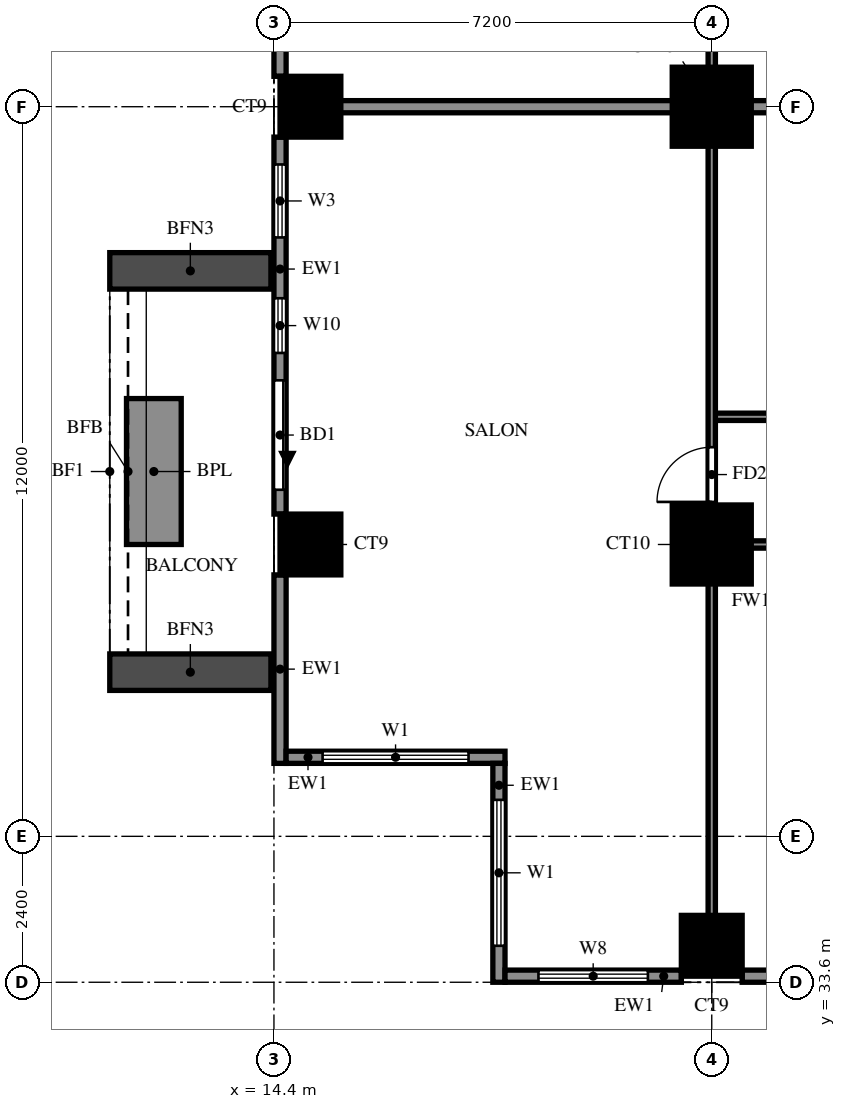
"""IFC4 building model, lengths in metres.
Left out: names, types, materials, properties, quantities, classifications, styles, units other than length and angle.
Written with IfcOpenShell. Run it as: python <this file> out.ifc"""

import sys

from ifc_helpers import new_model, si_unit, direction, frame, frame_2d, origin, origin_2d, place, context, subcontext, project, spatial, rectangle, extrude, source, transform, mapped, element, fill, save


model = new_model("IFC4")
c1 = context("Model", 3, precision=1e-05, world=origin(), true_north=direction((0.0, 1.0)))
c2 = subcontext(c1, "Body", "Model", "MODEL_VIEW")
j1 = project(units=[si_unit("LENGTHUNIT", "METRE"), si_unit("PLANEANGLEUNIT", "RADIAN")], contexts=[c1])
p1 = place(None, origin())
s1 = spatial("IfcSite", under=j1, at=p1, CompositionType="ELEMENT")
p2 = place(p1, origin())
s2 = spatial("IfcBuilding", under=s1, at=p2, CompositionType="ELEMENT")
p3 = place(p2, frame((0.0, 0.0, 86.5)))
s3 = spatial("IfcBuildingStorey", under=s2, at=p3, CompositionType="ELEMENT", Elevation=86.5)
m1 = source(origin(), c2, "Body", "SweptSolid", [
    extrude(rectangle(XDim=1.0, YDim=1.0, at=origin_2d()), origin(), (0.0, 0.0, 1.0), 3.18),
])
for number, where, z_axis, x_axis in (
    (1, (21.6, 34.2, 0.0), (0.0, 0.0, 1.0), (1.0, 0.0, 0.0)),
    (2, (15.0, 40.8, 0.0), (0.0, 0.0, 1.0), (1.0, 0.0, 0.0)),
):
    element("IfcColumn", number, at=place(p3, frame(where, z_axis=z_axis, x_axis=x_axis)), inside=s3, PredefinedType="COLUMN", context=c2, shape_type="MappedRepresentation", body=[
        mapped(m1, transform((0.0, 0.0, 0.0))),
    ])
m2 = source(origin(), c2, "Body", "SweptSolid", [
    extrude(rectangle(XDim=1.3, YDim=1.3, at=origin_2d()), origin(), (0.0, 0.0, 1.0), 3.18),
])
p4 = place(p3, frame((21.6, 40.8, 0.0), z_axis=(0.0, 0.0, 1.0), x_axis=(1.0, 0.0, 0.0)))
e3 = element("IfcColumn", 3, at=p4, inside=s3, PredefinedType="COLUMN", context=c2, shape_type="MappedRepresentation", body=[
    mapped(m2, transform((0.0, 0.0, 0.0))),
])
p5 = place(p3, frame((15.0, 48.0, 0.0), z_axis=(0.0, 0.0, 1.0), x_axis=(1.0, 0.0, 0.0)))
e4 = element("IfcColumn", 4, at=p5, inside=s3, PredefinedType="COLUMN", context=c2, shape_type="MappedRepresentation", body=[
    mapped(m1, transform((0.0, 0.0, 0.0))),
])
p6 = place(p3, frame((21.6, 48.0, 0.0), z_axis=(0.0, 0.0, 1.0), x_axis=(1.0, 0.0, 0.0)))
e5 = element("IfcColumn", 5, at=p6, inside=s3, PredefinedType="COLUMN", context=c2, shape_type="MappedRepresentation", body=[
    mapped(m2, transform((0.0, 0.0, 0.0))),
])
p7 = place(p3, frame((14.5, 54.7, 0.0), z_axis=(0.0, 0.0, 1.0), x_axis=(0.0, -1.0, 0.0)))
e6 = element("IfcWall", 6, at=p7, inside=s3, PredefinedType="SOLIDWALL", context=c2, shape_type="SweptSolid", body=[
    extrude(rectangle(XDim=6.2, YDim=0.2, at=frame_2d((3.1, 0.0))), origin(), (0.0, 0.0, 1.0), 3.18),
])
p8 = place(p7, frame((3.65, 0.0, 0.6)))
e7 = element("IfcOpeningElement", 7, at=p8, cuts=e6, PredefinedType="OPENING", context=c2, shape_type="SweptSolid", body=[
    extrude(rectangle(XDim=1.8, YDim=2.4, at=frame_2d((0.9, 1.2))), frame((0.0, 0.11, 0.0), z_axis=(0.0, -1.0, 0.0), x_axis=(1.0, 0.0, 0.0)), (0.0, 0.0, 1.0), 0.22),
])
p9 = place(p7, frame((2.05, 0.0, 0.6)))
e8 = element("IfcOpeningElement", 8, at=p9, cuts=e6, PredefinedType="OPENING", context=c2, shape_type="SweptSolid", body=[
    extrude(rectangle(XDim=0.9, YDim=2.4, at=frame_2d((0.45, 1.2))), frame((0.0, 0.11, 0.0), z_axis=(0.0, -1.0, 0.0), x_axis=(1.0, 0.0, 0.0)), (0.0, 0.0, 1.0), 0.22),
])
p10 = place(p3, frame((14.5, 47.5, 0.0), z_axis=(0.0, 0.0, 1.0), x_axis=(0.0, -1.0, 0.0)))
e9 = element("IfcWall", 9, at=p10, inside=s3, PredefinedType="SOLIDWALL", context=c2, shape_type="SweptSolid", body=[
    extrude(rectangle(XDim=6.2, YDim=0.2, at=frame_2d((3.1, 0.0))), origin(), (0.0, 0.0, 1.0), 3.18),
])
p11 = place(p10, frame((4.0, 0.0, 0.0)))
e10 = element("IfcOpeningElement", 10, at=p11, cuts=e9, PredefinedType="OPENING", context=c2, shape_type="SweptSolid", body=[
    extrude(rectangle(XDim=1.8, YDim=2.4, at=frame_2d((0.9, 1.2))), frame((0.0, 0.11, 0.0), z_axis=(0.0, -1.0, 0.0), x_axis=(1.0, 0.0, 0.0)), (0.0, 0.0, 1.0), 0.22),
])
p12 = place(p10, frame((0.45, 0.0, 0.6)))
e11 = element("IfcOpeningElement", 11, at=p12, cuts=e9, PredefinedType="OPENING", context=c2, shape_type="SweptSolid", body=[
    extrude(rectangle(XDim=1.2, YDim=2.4, at=frame_2d((0.6, 1.2))), frame((0.0, 0.11, 0.0), z_axis=(0.0, -1.0, 0.0), x_axis=(1.0, 0.0, 0.0)), (0.0, 0.0, 1.0), 0.22),
])
p13 = place(p10, frame((2.65, 0.0, 0.6)))
e12 = element("IfcOpeningElement", 12, at=p13, cuts=e9, PredefinedType="OPENING", context=c2, shape_type="SweptSolid", body=[
    extrude(rectangle(XDim=0.9, YDim=2.4, at=frame_2d((0.45, 1.2))), frame((0.0, 0.11, 0.0), z_axis=(0.0, -1.0, 0.0), x_axis=(1.0, 0.0, 0.0)), (0.0, 0.0, 1.0), 0.22),
])
p14 = place(p3, frame((14.5, 40.3, 0.0), z_axis=(0.0, 0.0, 1.0), x_axis=(0.0, -1.0, 0.0)))
e13 = element("IfcWall", 13, at=p14, inside=s3, PredefinedType="SOLIDWALL", context=c2, shape_type="SweptSolid", body=[
    extrude(rectangle(XDim=3.1, YDim=0.2, at=frame_2d((1.55, 0.0))), origin(), (0.0, 0.0, 1.0), 3.18),
])
p15 = place(p3, frame((14.6, 37.3, 0.0), z_axis=(0.0, 0.0, 1.0), x_axis=(1.0, 0.0, 0.0)))
e14 = element("IfcWall", 14, at=p15, inside=s3, PredefinedType="SOLIDWALL", context=c2, shape_type="SweptSolid", body=[
    extrude(rectangle(XDim=3.6, YDim=0.2, at=frame_2d((1.8, 0.0))), origin(), (0.0, 0.0, 1.0), 3.18),
])
p16 = place(p15, frame((0.6, 0.0, 0.6)))
e15 = element("IfcOpeningElement", 15, at=p16, cuts=e14, PredefinedType="OPENING", context=c2, shape_type="SweptSolid", body=[
    extrude(rectangle(XDim=2.4, YDim=2.4, at=frame_2d((1.2, 1.2))), frame((0.0, 0.11, 0.0), z_axis=(0.0, -1.0, 0.0), x_axis=(1.0, 0.0, 0.0)), (0.0, 0.0, 1.0), 0.22),
])
p17 = place(p3, frame((18.1, 37.2, 0.0), z_axis=(0.0, 0.0, 1.0), x_axis=(0.0, -1.0, 0.0)))
e16 = element("IfcWall", 16, at=p17, inside=s3, PredefinedType="SOLIDWALL", context=c2, shape_type="SweptSolid", body=[
    extrude(rectangle(XDim=3.6, YDim=0.2, at=frame_2d((1.8, 0.0))), origin(), (0.0, 0.0, 1.0), 3.18),
])
p18 = place(p17, frame((0.6, 0.0, 0.6)))
e17 = element("IfcOpeningElement", 17, at=p18, cuts=e16, PredefinedType="OPENING", context=c2, shape_type="SweptSolid", body=[
    extrude(rectangle(XDim=2.4, YDim=2.4, at=frame_2d((1.2, 1.2))), frame((0.0, 0.11, 0.0), z_axis=(0.0, -1.0, 0.0), x_axis=(1.0, 0.0, 0.0)), (0.0, 0.0, 1.0), 0.22),
])
p19 = place(p3, frame((18.2, 33.7, 0.0), z_axis=(0.0, 0.0, 1.0), x_axis=(1.0, 0.0, 0.0)))
e18 = element("IfcWall", 18, at=p19, inside=s3, PredefinedType="SOLIDWALL", context=c2, shape_type="SweptSolid", body=[
    extrude(rectangle(XDim=2.9, YDim=0.2, at=frame_2d((1.45, 0.0))), origin(), (0.0, 0.0, 1.0), 3.18),
])
p20 = place(p19, frame((0.55, 0.0, 0.6)))
e19 = element("IfcOpeningElement", 19, at=p20, cuts=e18, PredefinedType="OPENING", context=c2, shape_type="SweptSolid", body=[
    extrude(rectangle(XDim=1.8, YDim=2.4, at=frame_2d((0.9, 1.2))), frame((0.0, 0.11, 0.0), z_axis=(0.0, -1.0, 0.0), x_axis=(1.0, 0.0, 0.0)), (0.0, 0.0, 1.0), 0.22),
])
p21 = place(p3, frame((22.1, 33.7, 0.0), z_axis=(0.0, 0.0, 1.0), x_axis=(1.0, 0.0, 0.0)))
e20 = element("IfcWall", 20, at=p21, inside=s3, PredefinedType="SOLIDWALL", context=c2, shape_type="SweptSolid", body=[
    extrude(rectangle(XDim=6.2, YDim=0.2, at=frame_2d((3.1, 0.0))), origin(), (0.0, 0.0, 1.0), 3.18),
])
p22 = place(p21, frame((0.75, 0.0, 0.6)))
e21 = element("IfcOpeningElement", 21, at=p22, cuts=e20, PredefinedType="OPENING", context=c2, shape_type="SweptSolid", body=[
    extrude(rectangle(XDim=1.8, YDim=2.4, at=frame_2d((0.9, 1.2))), frame((0.0, 0.11, 0.0), z_axis=(0.0, -1.0, 0.0), x_axis=(1.0, 0.0, 0.0)), (0.0, 0.0, 1.0), 0.22),
])
p23 = place(p21, frame((3.25, 0.0, 1.5)))
e22 = element("IfcOpeningElement", 22, at=p23, cuts=e20, PredefinedType="OPENING", context=c2, shape_type="SweptSolid", body=[
    extrude(rectangle(XDim=0.9, YDim=0.9, at=frame_2d((0.45, 0.45))), frame((0.0, 0.11, 0.0), z_axis=(0.0, -1.0, 0.0), x_axis=(1.0, 0.0, 0.0)), (0.0, 0.0, 1.0), 0.22),
])
p24 = place(p21, frame((5.0, 0.0, 1.5)))
e23 = element("IfcOpeningElement", 23, at=p24, cuts=e20, PredefinedType="OPENING", context=c2, shape_type="SweptSolid", body=[
    extrude(rectangle(XDim=0.9, YDim=0.9, at=frame_2d((0.45, 0.45))), frame((0.0, 0.11, 0.0), z_axis=(0.0, -1.0, 0.0), x_axis=(1.0, 0.0, 0.0)), (0.0, 0.0, 1.0), 0.22),
])
for number, where, z_axis, x_axis in (
    (24, (14.35, 45.3, 0.0), (0.0, 0.0, 1.0), (-1.0, 0.0, 0.0)),
    (25, (14.35, 38.7, 0.0), (0.0, 0.0, 1.0), (-1.0, 0.0, 0.0)),
):
    element("IfcWall", number, at=place(p3, frame(where, z_axis=z_axis, x_axis=x_axis)), inside=s3, PredefinedType="SOLIDWALL", context=c2, shape_type="SweptSolid", body=[
        extrude(rectangle(XDim=2.65, YDim=0.6, at=frame_2d((1.325, 0.0))), origin(), (0.0, 0.0, 1.0), 2.85),
    ])
p25 = place(p3, frame((12.425, 43.2, 0.0), z_axis=(0.0, 0.0, 1.0), x_axis=(0.0, -1.0, 0.0)))
e26 = element("IfcWall", 26, at=p25, inside=s3, PredefinedType="SOLIDWALL", context=c2, shape_type="SweptSolid", body=[
    extrude(rectangle(XDim=2.4, YDim=0.9, at=frame_2d((1.2, 0.0))), origin(), (0.0, 0.0, 1.0), 0.9),
])
p26 = place(p3, frame((14.525, 48.0, 0.0), z_axis=(0.0, 0.0, 1.0), x_axis=(1.0, 0.0, 0.0)))
e27 = element("IfcWall", 27, at=p26, inside=s3, PredefinedType="SOLIDWALL", context=c2, shape_type="SweptSolid", body=[
    extrude(rectangle(XDim=19.075, YDim=0.2, at=frame_2d((9.538, 0.0))), origin(), (0.0, 0.0, 1.0), 3.18),
])
p27 = place(p3, frame((21.6, 40.8, 0.0), z_axis=(0.0, 0.0, 1.0), x_axis=(1.0, 0.0, 0.0)))
e28 = element("IfcWall", 28, at=p27, inside=s3, PredefinedType="PARTITIONING", context=c2, shape_type="SweptSolid", body=[
    extrude(rectangle(XDim=3.6, YDim=0.12, at=frame_2d((1.8, 0.0))), origin(), (0.0, 0.0, 1.0), 3.18),
])
p28 = place(p27, frame((1.35, 0.0, 0.0)))
e29 = element("IfcOpeningElement", 29, at=p28, cuts=e28, PredefinedType="OPENING", context=c2, shape_type="SweptSolid", body=[
    extrude(rectangle(XDim=0.9, YDim=2.1, at=frame_2d((0.45, 1.05))), frame((0.0, 0.07, 0.0), z_axis=(0.0, -1.0, 0.0), x_axis=(1.0, 0.0, 0.0)), (0.0, 0.0, 1.0), 0.14),
])
p29 = place(p3, frame((21.6, 42.9, 0.0), z_axis=(0.0, 0.0, 1.0), x_axis=(1.0, 0.0, 0.0)))
e30 = element("IfcWall", 30, at=p29, inside=s3, PredefinedType="PARTITIONING", context=c2, shape_type="SweptSolid", body=[
    extrude(rectangle(XDim=14.4, YDim=0.12, at=frame_2d((7.2, 0.0))), origin(), (0.0, 0.0, 1.0), 3.18),
])
p30 = place(p29, frame((2.1, 0.0, 0.0)))
e31 = element("IfcOpeningElement", 31, at=p30, cuts=e30, PredefinedType="OPENING", context=c2, shape_type="SweptSolid", body=[
    extrude(rectangle(XDim=0.9, YDim=2.1, at=frame_2d((0.45, 1.05))), frame((0.0, 0.07, 0.0), z_axis=(0.0, -1.0, 0.0), x_axis=(1.0, 0.0, 0.0)), (0.0, 0.0, 1.0), 0.14),
])
p31 = place(p29, frame((5.85, 0.0, 0.0)))
e32 = element("IfcOpeningElement", 32, at=p31, cuts=e30, PredefinedType="OPENING", context=c2, shape_type="SweptSolid", body=[
    extrude(rectangle(XDim=0.8, YDim=2.1, at=frame_2d((0.4, 1.05))), frame((0.0, 0.07, 0.0), z_axis=(0.0, -1.0, 0.0), x_axis=(1.0, 0.0, 0.0)), (0.0, 0.0, 1.0), 0.14),
])
p32 = place(p29, frame((9.25, 0.0, 0.0)))
e33 = element("IfcOpeningElement", 33, at=p32, cuts=e30, PredefinedType="OPENING", context=c2, shape_type="SweptSolid", body=[
    extrude(rectangle(XDim=0.9, YDim=2.1, at=frame_2d((0.45, 1.05))), frame((0.0, 0.07, 0.0), z_axis=(0.0, -1.0, 0.0), x_axis=(1.0, 0.0, 0.0)), (0.0, 0.0, 1.0), 0.14),
])
p33 = place(p3, frame((21.6, 33.725, 0.0), z_axis=(0.0, 0.0, 1.0), x_axis=(0.0, 1.0, 0.0)))
e34 = element("IfcWall", 34, at=p33, inside=s3, PredefinedType="PARTITIONING", context=c2, shape_type="SweptSolid", body=[
    extrude(rectangle(XDim=32.275, YDim=0.12, at=frame_2d((16.137, 0.0))), origin(), (0.0, 0.0, 1.0), 3.18),
])
p34 = place(p33, frame((7.775, 0.0, 0.0)))
e35 = element("IfcOpeningElement", 35, at=p34, cuts=e34, PredefinedType="OPENING", context=c2, shape_type="SweptSolid", body=[
    extrude(rectangle(XDim=0.9, YDim=2.1, at=frame_2d((0.45, 1.05))), frame((0.0, 0.07, 0.0), z_axis=(0.0, -1.0, 0.0), x_axis=(1.0, 0.0, 0.0)), (0.0, 0.0, 1.0), 0.14),
])
p35 = place(p33, frame((15.625, 0.0, 0.0)))
e36 = element("IfcOpeningElement", 36, at=p35, cuts=e34, PredefinedType="OPENING", context=c2, shape_type="SweptSolid", body=[
    extrude(rectangle(XDim=0.9, YDim=2.1, at=frame_2d((0.45, 1.05))), frame((0.0, 0.07, 0.0), z_axis=(0.0, -1.0, 0.0), x_axis=(1.0, 0.0, 0.0)), (0.0, 0.0, 1.0), 0.14),
])
p36 = place(p33, frame((22.225, 0.0, 0.0)))
e37 = element("IfcOpeningElement", 37, at=p36, cuts=e34, PredefinedType="OPENING", context=c2, shape_type="SweptSolid", body=[
    extrude(rectangle(XDim=1.5, YDim=2.1, at=frame_2d((0.75, 1.05))), frame((0.0, 0.07, 0.0), z_axis=(0.0, -1.0, 0.0), x_axis=(1.0, 0.0, 0.0)), (0.0, 0.0, 1.0), 0.14),
])
p37 = place(p33, frame((26.425, 0.0, 0.0)))
e38 = element("IfcOpeningElement", 38, at=p37, cuts=e34, PredefinedType="OPENING", context=c2, shape_type="SweptSolid", body=[
    extrude(rectangle(XDim=0.9, YDim=2.1, at=frame_2d((0.45, 1.05))), frame((0.0, 0.07, 0.0), z_axis=(0.0, -1.0, 0.0), x_axis=(1.0, 0.0, 0.0)), (0.0, 0.0, 1.0), 0.14),
])
p38 = place(p33, frame((30.025, 0.0, 0.0)))
e39 = element("IfcOpeningElement", 39, at=p38, cuts=e34, PredefinedType="OPENING", context=c2, shape_type="SweptSolid", body=[
    extrude(rectangle(XDim=0.9, YDim=2.1, at=frame_2d((0.45, 1.05))), frame((0.0, 0.07, 0.0), z_axis=(0.0, -1.0, 0.0), x_axis=(1.0, 0.0, 0.0)), (0.0, 0.0, 1.0), 0.14),
])
p39 = place(p11, origin())
e40 = element("IfcDoor", 40, at=p39, inside=s3, OperationType="DOUBLE_DOOR_SLIDING", PredefinedType="DOOR", context=c2, shape_type="SweptSolid", body=[
    extrude(rectangle(XDim=1.8, YDim=2.4, at=frame_2d((0.9, 1.2))), frame((0.0, 0.025, 0.0), z_axis=(0.0, -1.0, 0.0), x_axis=(1.0, 0.0, 0.0)), (0.0, 0.0, 1.0), 0.05),
])
fill(e10, e40)
p40 = place(p12, origin())
e41 = element("IfcWindow", 41, at=p40, inside=s3, PartitioningType="SINGLE_PANEL", PredefinedType="WINDOW", context=c2, shape_type="SweptSolid", body=[
    extrude(rectangle(XDim=1.2, YDim=2.4, at=frame_2d((0.6, 1.2))), frame((0.0, 0.03, 0.0), z_axis=(0.0, -1.0, 0.0), x_axis=(1.0, 0.0, 0.0)), (0.0, 0.0, 1.0), 0.06),
])
fill(e11, e41)
p41 = place(p13, origin())
e42 = element("IfcWindow", 42, at=p41, inside=s3, PartitioningType="SINGLE_PANEL", PredefinedType="WINDOW", context=c2, shape_type="SweptSolid", body=[
    extrude(rectangle(XDim=0.9, YDim=2.4, at=frame_2d((0.45, 1.2))), frame((0.0, 0.03, 0.0), z_axis=(0.0, -1.0, 0.0), x_axis=(1.0, 0.0, 0.0)), (0.0, 0.0, 1.0), 0.06),
])
fill(e12, e42)
p42 = place(p16, origin())
e43 = element("IfcWindow", 43, at=p42, inside=s3, PartitioningType="DOUBLE_PANEL_VERTICAL", PredefinedType="WINDOW", context=c2, shape_type="SweptSolid", body=[
    extrude(rectangle(XDim=2.4, YDim=2.4, at=frame_2d((1.2, 1.2))), frame((0.0, 0.03, 0.0), z_axis=(0.0, -1.0, 0.0), x_axis=(1.0, 0.0, 0.0)), (0.0, 0.0, 1.0), 0.06),
])
fill(e15, e43)
p43 = place(p18, origin())
e44 = element("IfcWindow", 44, at=p43, inside=s3, PartitioningType="DOUBLE_PANEL_VERTICAL", PredefinedType="WINDOW", context=c2, shape_type="SweptSolid", body=[
    extrude(rectangle(XDim=2.4, YDim=2.4, at=frame_2d((1.2, 1.2))), frame((0.0, 0.03, 0.0), z_axis=(0.0, -1.0, 0.0), x_axis=(1.0, 0.0, 0.0)), (0.0, 0.0, 1.0), 0.06),
])
fill(e17, e44)
p44 = place(p20, origin())
e45 = element("IfcWindow", 45, at=p44, inside=s3, PartitioningType="DOUBLE_PANEL_VERTICAL", PredefinedType="WINDOW", context=c2, shape_type="SweptSolid", body=[
    extrude(rectangle(XDim=1.8, YDim=2.4, at=frame_2d((0.9, 1.2))), frame((0.0, 0.03, 0.0), z_axis=(0.0, -1.0, 0.0), x_axis=(1.0, 0.0, 0.0)), (0.0, 0.0, 1.0), 0.06),
])
fill(e19, e45)
p45 = place(p34, origin())
e46 = element("IfcDoor", 46, at=p45, inside=s3, OperationType="SINGLE_SWING_RIGHT", PredefinedType="DOOR", context=c2, shape_type="SweptSolid", body=[
    extrude(rectangle(XDim=0.9, YDim=2.1, at=frame_2d((0.45, 1.05))), frame((0.0, 0.025, 0.0), z_axis=(0.0, -1.0, 0.0), x_axis=(1.0, 0.0, 0.0)), (0.0, 0.0, 1.0), 0.05),
])
fill(e35, e46)
save(model, sys.argv[1])
